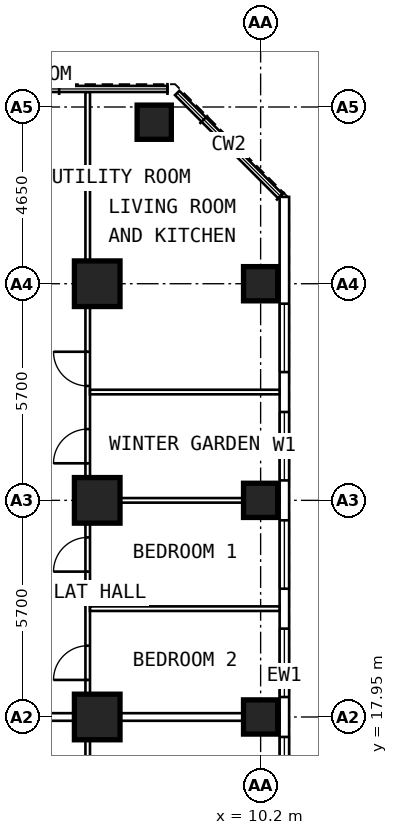
"""IFC4 building model, lengths in metres.
Left out: names, types, materials, properties, quantities, classifications, styles, units other than length and angle.
Written with IfcOpenShell. Run it as: python <this file> out.ifc"""

import sys

from ifc_helpers import new_model, si_unit, direction, frame, frame_2d, origin, origin_2d, place, context, subcontext, project, spatial, rectangle, extrude, element, fill, save


model = new_model("IFC4")
c1 = context("Model", 3, precision=1e-05, world=origin(), true_north=direction((0.0, 1.0)))
c2 = subcontext(c1, "Body", "Model", "MODEL_VIEW")
j1 = project(units=[si_unit("LENGTHUNIT", "METRE"), si_unit("PLANEANGLEUNIT", "RADIAN")], contexts=[c1])
p1 = place(None, origin())
s1 = spatial("IfcSite", under=j1, at=p1, CompositionType="ELEMENT")
p2 = place(p1, origin())
s2 = spatial("IfcBuilding", under=s1, at=p2, CompositionType="ELEMENT")
p3 = place(p2, frame((0.0, 0.0, 98.8)))
s3 = spatial("IfcBuildingStorey", under=s2, at=p3, CompositionType="ELEMENT", Elevation=98.8)
for number, where, z_axis, x_axis in (
    (1, (10.2, 17.95, 0.0), (0.0, 0.0, 1.0), (0.0, 1.0, 0.0)),
    (2, (10.2, 23.65, 0.0), (0.0, 0.0, 1.0), (0.0, 1.0, 0.0)),
    (3, (10.2, 29.35, 0.0), (0.0, 0.0, 1.0), (0.0, 1.0, 0.0)),
    (4, (7.4, 33.6, 0.0), (0.0, 0.0, 1.0), (0.0, 1.0, 0.0)),
):
    element("IfcColumn", number, at=place(p3, frame(where, z_axis=z_axis, x_axis=x_axis)), inside=s3, PredefinedType="COLUMN", context=c2, shape_type="SweptSolid", body=[
        extrude(rectangle(XDim=0.9, YDim=0.9, at=origin_2d()), origin(), (0.0, 0.0, 1.0), 3.6),
    ])
for number, where, z_axis, x_axis in (
    (5, (5.9, 17.95, 0.0), (0.0, 0.0, 1.0), (0.0, 1.0, 0.0)),
    (6, (5.9, 23.65, 0.0), (0.0, 0.0, 1.0), (0.0, 1.0, 0.0)),
    (7, (5.9, 29.35, 0.0), (0.0, 0.0, 1.0), (0.0, 1.0, 0.0)),
):
    element("IfcColumn", number, at=place(p3, frame(where, z_axis=z_axis, x_axis=x_axis)), inside=s3, PredefinedType="COLUMN", context=c2, shape_type="SweptSolid", body=[
        extrude(rectangle(XDim=1.2, YDim=1.2, at=origin_2d()), origin(), (0.0, 0.0, 1.0), 3.6),
    ])
p4 = place(p3, frame((10.825, 6.409, 0.0), z_axis=(0.0, 0.0, 1.0), x_axis=(0.0, 1.0, 0.0)))
e8 = element("IfcWall", 8, at=p4, inside=s3, PredefinedType="SOLIDWALL", context=c2, shape_type="SweptSolid", body=[
    extrude(rectangle(XDim=25.226, YDim=0.25, at=frame_2d((12.613, 0.0))), origin(), (0.0, 0.0, 1.0), 3.35),
])
p5 = place(p4, frame((0.666, 0.0, 0.8)))
e9 = element("IfcOpeningElement", 9, at=p5, cuts=e8, PredefinedType="OPENING", context=c2, shape_type="SweptSolid", body=[
    extrude(rectangle(XDim=1.8, YDim=1.8, at=frame_2d((0.9, 0.9))), frame((0.0, 0.137, 0.0), z_axis=(0.0, -1.0, 0.0), x_axis=(1.0, 0.0, 0.0)), (0.0, 0.0, 1.0), 0.274),
])
p6 = place(p4, frame((3.516, 0.0, 0.8)))
e10 = element("IfcOpeningElement", 10, at=p6, cuts=e8, PredefinedType="OPENING", context=c2, shape_type="SweptSolid", body=[
    extrude(rectangle(XDim=1.8, YDim=1.8, at=frame_2d((0.9, 0.9))), frame((0.0, 0.137, 0.0), z_axis=(0.0, -1.0, 0.0), x_axis=(1.0, 0.0, 0.0)), (0.0, 0.0, 1.0), 0.274),
])
p7 = place(p4, frame((6.366, 0.0, 0.8)))
e11 = element("IfcOpeningElement", 11, at=p7, cuts=e8, PredefinedType="OPENING", context=c2, shape_type="SweptSolid", body=[
    extrude(rectangle(XDim=1.8, YDim=1.8, at=frame_2d((0.9, 0.9))), frame((0.0, 0.137, 0.0), z_axis=(0.0, -1.0, 0.0), x_axis=(1.0, 0.0, 0.0)), (0.0, 0.0, 1.0), 0.274),
])
p8 = place(p4, frame((9.216, 0.0, 0.8)))
e12 = element("IfcOpeningElement", 12, at=p8, cuts=e8, PredefinedType="OPENING", context=c2, shape_type="SweptSolid", body=[
    extrude(rectangle(XDim=1.8, YDim=1.8, at=frame_2d((0.9, 0.9))), frame((0.0, 0.137, 0.0), z_axis=(0.0, -1.0, 0.0), x_axis=(1.0, 0.0, 0.0)), (0.0, 0.0, 1.0), 0.274),
])
p9 = place(p4, frame((12.066, 0.0, 0.8)))
e13 = element("IfcOpeningElement", 13, at=p9, cuts=e8, PredefinedType="OPENING", context=c2, shape_type="SweptSolid", body=[
    extrude(rectangle(XDim=1.8, YDim=1.8, at=frame_2d((0.9, 0.9))), frame((0.0, 0.137, 0.0), z_axis=(0.0, -1.0, 0.0), x_axis=(1.0, 0.0, 0.0)), (0.0, 0.0, 1.0), 0.274),
])
p10 = place(p4, frame((14.916, 0.0, 0.8)))
e14 = element("IfcOpeningElement", 14, at=p10, cuts=e8, PredefinedType="OPENING", context=c2, shape_type="SweptSolid", body=[
    extrude(rectangle(XDim=1.8, YDim=1.8, at=frame_2d((0.9, 0.9))), frame((0.0, 0.137, 0.0), z_axis=(0.0, -1.0, 0.0), x_axis=(1.0, 0.0, 0.0)), (0.0, 0.0, 1.0), 0.274),
])
p11 = place(p4, frame((17.766, 0.0, 0.8)))
e15 = element("IfcOpeningElement", 15, at=p11, cuts=e8, PredefinedType="OPENING", context=c2, shape_type="SweptSolid", body=[
    extrude(rectangle(XDim=1.8, YDim=1.8, at=frame_2d((0.9, 0.9))), frame((0.0, 0.137, 0.0), z_axis=(0.0, -1.0, 0.0), x_axis=(1.0, 0.0, 0.0)), (0.0, 0.0, 1.0), 0.274),
])
p12 = place(p4, frame((20.616, 0.0, 0.8)))
e16 = element("IfcOpeningElement", 16, at=p12, cuts=e8, PredefinedType="OPENING", context=c2, shape_type="SweptSolid", body=[
    extrude(rectangle(XDim=1.8, YDim=1.8, at=frame_2d((0.9, 0.9))), frame((0.0, 0.137, 0.0), z_axis=(0.0, -1.0, 0.0), x_axis=(1.0, 0.0, 0.0)), (0.0, 0.0, 1.0), 0.274),
])
p13 = place(p3, frame((5.65, 9.6, 0.0), z_axis=(0.0, 0.0, 1.0), x_axis=(0.0, 1.0, 0.0)))
e17 = element("IfcWall", 17, at=p13, inside=s3, PredefinedType="PARTITIONING", context=c2, shape_type="SweptSolid", body=[
    extrude(rectangle(XDim=8.1, YDim=0.12, at=frame_2d((4.05, 0.0))), origin(), (0.0, 0.0, 1.0), 3.35),
])
p14 = place(p13, frame((5.05, 0.0, 0.0)))
e18 = element("IfcOpeningElement", 18, at=p14, cuts=e17, PredefinedType="OPENING", context=c2, shape_type="SweptSolid", body=[
    extrude(rectangle(XDim=0.9, YDim=2.1, at=frame_2d((0.45, 1.05))), frame((0.0, 0.072, 0.0), z_axis=(0.0, -1.0, 0.0), x_axis=(1.0, 0.0, 0.0)), (0.0, 0.0, 1.0), 0.144),
])
p15 = place(p3, frame((5.65, 18.05, 0.0), z_axis=(0.0, 0.0, 1.0), x_axis=(0.0, 1.0, 0.0)))
e19 = element("IfcWall", 19, at=p15, inside=s3, PredefinedType="PARTITIONING", context=c2, shape_type="SweptSolid", body=[
    extrude(rectangle(XDim=16.345, YDim=0.12, at=frame_2d((8.172, 0.0))), origin(), (0.0, 0.0, 1.0), 3.35),
])
p16 = place(p15, frame((0.875, 0.0, 0.0)))
e20 = element("IfcOpeningElement", 20, at=p16, cuts=e19, PredefinedType="OPENING", context=c2, shape_type="SweptSolid", body=[
    extrude(rectangle(XDim=0.9, YDim=2.1, at=frame_2d((0.45, 1.05))), frame((0.0, 0.072, 0.0), z_axis=(0.0, -1.0, 0.0), x_axis=(1.0, 0.0, 0.0)), (0.0, 0.0, 1.0), 0.144),
])
p17 = place(p15, frame((3.725, 0.0, 0.0)))
e21 = element("IfcOpeningElement", 21, at=p17, cuts=e19, PredefinedType="OPENING", context=c2, shape_type="SweptSolid", body=[
    extrude(rectangle(XDim=0.9, YDim=2.1, at=frame_2d((0.45, 1.05))), frame((0.0, 0.072, 0.0), z_axis=(0.0, -1.0, 0.0), x_axis=(1.0, 0.0, 0.0)), (0.0, 0.0, 1.0), 0.144),
])
p18 = place(p15, frame((6.575, 0.0, 0.0)))
e22 = element("IfcOpeningElement", 22, at=p18, cuts=e19, PredefinedType="OPENING", context=c2, shape_type="SweptSolid", body=[
    extrude(rectangle(XDim=0.9, YDim=2.1, at=frame_2d((0.45, 1.05))), frame((0.0, 0.072, 0.0), z_axis=(0.0, -1.0, 0.0), x_axis=(1.0, 0.0, 0.0)), (0.0, 0.0, 1.0), 0.144),
])
p19 = place(p15, frame((8.61, 0.0, 0.0)))
e23 = element("IfcOpeningElement", 23, at=p19, cuts=e19, PredefinedType="OPENING", context=c2, shape_type="SweptSolid", body=[
    extrude(rectangle(XDim=0.9, YDim=2.1, at=frame_2d((0.45, 1.05))), frame((0.0, 0.072, 0.0), z_axis=(0.0, -1.0, 0.0), x_axis=(1.0, 0.0, 0.0)), (0.0, 0.0, 1.0), 0.144),
])
p20 = place(p3, frame((5.71, 20.8, 0.0), z_axis=(0.0, 0.0, 1.0), x_axis=(1.0, 0.0, 0.0)))
e24 = element("IfcWall", 24, at=p20, inside=s3, PredefinedType="PARTITIONING", context=c2, shape_type="SweptSolid", body=[
    extrude(rectangle(XDim=4.99, YDim=0.12, at=frame_2d((2.495, 0.0))), origin(), (0.0, 0.0, 1.0), 3.35),
])
p21 = place(p3, frame((5.71, 23.65, 0.0), z_axis=(0.0, 0.0, 1.0), x_axis=(1.0, 0.0, 0.0)))
e25 = element("IfcWall", 25, at=p21, inside=s3, PredefinedType="PARTITIONING", context=c2, shape_type="SweptSolid", body=[
    extrude(rectangle(XDim=4.99, YDim=0.12, at=frame_2d((2.495, 0.0))), origin(), (0.0, 0.0, 1.0), 2.45),
])
p22 = place(p3, frame((5.71, 26.5, 0.0), z_axis=(0.0, 0.0, 1.0), x_axis=(1.0, 0.0, 0.0)))
e26 = element("IfcWall", 26, at=p22, inside=s3, PredefinedType="PARTITIONING", context=c2, shape_type="SweptSolid", body=[
    extrude(rectangle(XDim=4.99, YDim=0.12, at=frame_2d((2.495, 0.0))), origin(), (0.0, 0.0, 1.0), 3.35),
])
p23 = place(p3, frame((2.1, 17.95, 0.0), z_axis=(0.0, 0.0, 1.0), x_axis=(1.0, 0.0, 0.0)))
e27 = element("IfcWall", 27, at=p23, inside=s3, PredefinedType="PARTITIONING", context=c2, shape_type="SweptSolid", body=[
    extrude(rectangle(XDim=8.6, YDim=0.2, at=frame_2d((4.3, 0.0))), origin(), (0.0, 0.0, 1.0), 2.45),
])
p24 = place(p8, origin())
e28 = element("IfcWindow", 28, at=p24, inside=s3, PartitioningType="SINGLE_PANEL", PredefinedType="WINDOW", context=c2, shape_type="SweptSolid", body=[
    extrude(rectangle(XDim=1.8, YDim=1.8, at=frame_2d((0.9, 0.9))), frame((0.0, 0.03, 0.0), z_axis=(0.0, -1.0, 0.0), x_axis=(1.0, 0.0, 0.0)), (0.0, 0.0, 1.0), 0.06),
])
fill(e12, e28)
p25 = place(p9, origin())
e29 = element("IfcWindow", 29, at=p25, inside=s3, PartitioningType="SINGLE_PANEL", PredefinedType="WINDOW", context=c2, shape_type="SweptSolid", body=[
    extrude(rectangle(XDim=1.8, YDim=1.8, at=frame_2d((0.9, 0.9))), frame((0.0, 0.03, 0.0), z_axis=(0.0, -1.0, 0.0), x_axis=(1.0, 0.0, 0.0)), (0.0, 0.0, 1.0), 0.06),
])
fill(e13, e29)
p26 = place(p10, origin())
e30 = element("IfcWindow", 30, at=p26, inside=s3, PartitioningType="SINGLE_PANEL", PredefinedType="WINDOW", context=c2, shape_type="SweptSolid", body=[
    extrude(rectangle(XDim=1.8, YDim=1.8, at=frame_2d((0.9, 0.9))), frame((0.0, 0.03, 0.0), z_axis=(0.0, -1.0, 0.0), x_axis=(1.0, 0.0, 0.0)), (0.0, 0.0, 1.0), 0.06),
])
fill(e14, e30)
p27 = place(p11, origin())
e31 = element("IfcWindow", 31, at=p27, inside=s3, PartitioningType="SINGLE_PANEL", PredefinedType="WINDOW", context=c2, shape_type="SweptSolid", body=[
    extrude(rectangle(XDim=1.8, YDim=1.8, at=frame_2d((0.9, 0.9))), frame((0.0, 0.03, 0.0), z_axis=(0.0, -1.0, 0.0), x_axis=(1.0, 0.0, 0.0)), (0.0, 0.0, 1.0), 0.06),
])
fill(e15, e31)
p28 = place(p12, origin())
e32 = element("IfcWindow", 32, at=p28, inside=s3, PartitioningType="SINGLE_PANEL", PredefinedType="WINDOW", context=c2, shape_type="SweptSolid", body=[
    extrude(rectangle(XDim=1.8, YDim=1.8, at=frame_2d((0.9, 0.9))), frame((0.0, 0.03, 0.0), z_axis=(0.0, -1.0, 0.0), x_axis=(1.0, 0.0, 0.0)), (0.0, 0.0, 1.0), 0.06),
])
fill(e16, e32)
p29 = place(p16, origin())
e33 = element("IfcDoor", 33, at=p29, inside=s3, OperationType="SINGLE_SWING_LEFT", PredefinedType="DOOR", context=c2, shape_type="SweptSolid", body=[
    extrude(rectangle(XDim=0.9, YDim=2.1, at=frame_2d((0.45, 1.05))), frame((0.0, 0.025, 0.0), z_axis=(0.0, -1.0, 0.0), x_axis=(1.0, 0.0, 0.0)), (0.0, 0.0, 1.0), 0.05),
])
fill(e20, e33)
p30 = place(p17, origin())
e34 = element("IfcDoor", 34, at=p30, inside=s3, OperationType="SINGLE_SWING_LEFT", PredefinedType="DOOR", context=c2, shape_type="SweptSolid", body=[
    extrude(rectangle(XDim=0.9, YDim=2.1, at=frame_2d((0.45, 1.05))), frame((0.0, 0.025, 0.0), z_axis=(0.0, -1.0, 0.0), x_axis=(1.0, 0.0, 0.0)), (0.0, 0.0, 1.0), 0.05),
])
fill(e21, e34)
p31 = place(p18, origin())
e35 = element("IfcDoor", 35, at=p31, inside=s3, OperationType="SINGLE_SWING_LEFT", PredefinedType="DOOR", context=c2, shape_type="SweptSolid", body=[
    extrude(rectangle(XDim=0.9, YDim=2.1, at=frame_2d((0.45, 1.05))), frame((0.0, 0.025, 0.0), z_axis=(0.0, -1.0, 0.0), x_axis=(1.0, 0.0, 0.0)), (0.0, 0.0, 1.0), 0.05),
])
fill(e22, e35)
p32 = place(p19, origin())
e36 = element("IfcDoor", 36, at=p32, inside=s3, OperationType="SINGLE_SWING_RIGHT", PredefinedType="DOOR", context=c2, shape_type="SweptSolid", body=[
    extrude(rectangle(XDim=0.9, YDim=2.1, at=frame_2d((0.45, 1.05))), frame((0.0, 0.025, 0.0), z_axis=(0.0, -1.0, 0.0), x_axis=(1.0, 0.0, 0.0)), (0.0, 0.0, 1.0), 0.05),
])
fill(e23, e36)
save(model, sys.argv[1])
